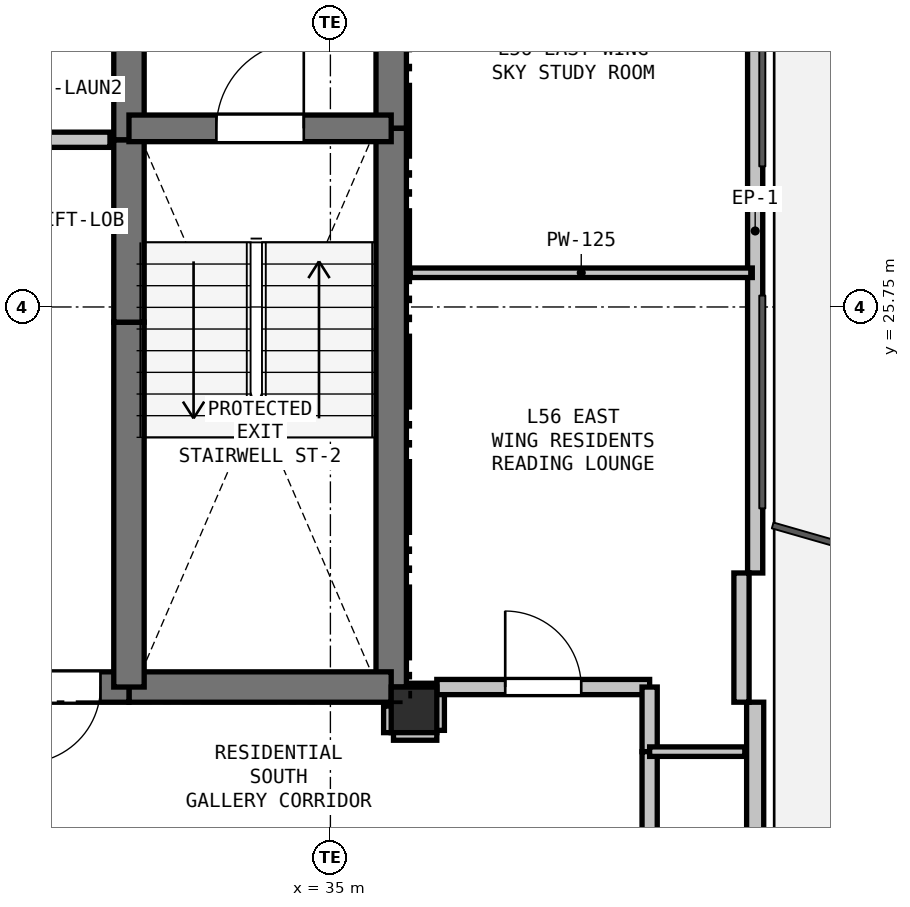
"""IFC4 building model, lengths in metres.
Left out: names, types, materials, properties, quantities, classifications, styles, units other than length and angle.
Written with IfcOpenShell. Run it as: python <this file> out.ifc"""

import sys

from ifc_helpers import new_model, si_unit, direction, frame, frame_2d, origin, origin_2d, place, context, subcontext, project, spatial, rectangle, extrude, element, fill, save


model = new_model("IFC4")
c1 = context("Model", 3, precision=1e-05, world=origin(), true_north=direction((0.0, 1.0)))
c2 = subcontext(c1, "Body", "Model", "MODEL_VIEW")
j1 = project(units=[si_unit("LENGTHUNIT", "METRE"), si_unit("PLANEANGLEUNIT", "RADIAN")], contexts=[c1])
p1 = place(None, origin())
s1 = spatial("IfcSite", under=j1, at=p1, CompositionType="ELEMENT")
p2 = place(p1, origin())
s2 = spatial("IfcBuilding", under=s1, at=p2, CompositionType="ELEMENT")
p3 = place(p2, frame((0.0, 0.0, 201.9)))
s3 = spatial("IfcBuildingStorey", under=s2, at=p3, CompositionType="ELEMENT", Elevation=201.9)
p4 = place(p3, frame((36.1, 20.45, 0.0), z_axis=(0.0, 0.0, 1.0), x_axis=(1.0, 0.0, 0.0)))
e1 = element("IfcColumn", 1, at=p4, inside=s3, PredefinedType="COLUMN", context=c2, shape_type="SweptSolid", body=[
    extrude(rectangle(XDim=0.6, YDim=0.6, at=origin_2d()), origin(), (0.0, 0.0, 1.0), 3.3),
])
p5 = place(p3, frame((40.588, 31.25, 0.0), z_axis=(0.0, 0.0, 1.0), x_axis=(0.0, -1.0, 0.0)))
e2 = element("IfcWall", 2, at=p5, inside=s3, PredefinedType="PARAPET", context=c2, shape_type="SweptSolid", body=[
    extrude(rectangle(XDim=8.999, YDim=0.2, at=frame_2d((4.5, 0.0))), origin(), (0.0, 0.0, 1.0), 0.2),
])
p6 = place(p3, frame((40.588, 20.551, 0.0), z_axis=(0.0, 0.0, 1.0), x_axis=(0.0, -1.0, 0.0)))
e3 = element("IfcWall", 3, at=p6, inside=s3, PredefinedType="SOLIDWALL", context=c2, shape_type="SweptSolid", body=[
    extrude(rectangle(XDim=9.699, YDim=0.225, at=frame_2d((4.85, 0.0))), origin(), (0.0, 0.0, 1.0), 2.69),
])
p7 = place(p6, frame((6.395, 0.0, 0.9)))
e4 = element("IfcOpeningElement", 4, at=p7, cuts=e3, PredefinedType="OPENING", context=c2, shape_type="SweptSolid", body=[
    extrude(rectangle(XDim=1.5, YDim=1.5, at=frame_2d((0.75, 0.75))), frame((0.0, 0.123, 0.0), z_axis=(0.0, -1.0, 0.0), x_axis=(1.0, 0.0, 0.0)), (0.0, 0.0, 1.0), 0.245),
])
p8 = place(p3, frame((40.408, 22.25, 0.0), z_axis=(0.0, 0.0, 1.0), x_axis=(0.0, -1.0, 0.0)))
e5 = element("IfcWall", 5, at=p8, inside=s3, PredefinedType="PARAPET", context=c2, shape_type="SweptSolid", body=[
    extrude(rectangle(XDim=1.7, YDim=0.2, at=frame_2d((0.85, 0.0))), origin(), (0.0, 0.0, 1.0), 2.69),
])
p9 = place(p3, frame((35.8, 32.75, 0.0), z_axis=(0.0, 0.0, 1.0), x_axis=(0.0, -1.0, 0.0)))
e6 = element("IfcWall", 6, at=p9, inside=s3, PredefinedType="SHEAR", context=c2, shape_type="SweptSolid", body=[
    extrude(rectangle(XDim=4.65, YDim=0.4, at=frame_2d((2.325, 0.0))), origin(), (0.0, 0.0, 1.0), 3.07),
])
p10 = place(p3, frame((35.8, 28.1, 0.0), z_axis=(0.0, 0.0, 1.0), x_axis=(0.0, -1.0, 0.0)))
e7 = element("IfcWall", 7, at=p10, inside=s3, PredefinedType="SHEAR", context=c2, shape_type="SweptSolid", body=[
    extrude(rectangle(XDim=7.35, YDim=0.4, at=frame_2d((3.675, 0.0))), origin(), (0.0, 0.0, 1.0), 3.07),
])
p11 = place(p3, frame((35.8, 20.75, 0.0), z_axis=(0.0, 0.0, 1.0), x_axis=(-1.0, 0.0, 0.0)))
e8 = element("IfcWall", 8, at=p11, inside=s3, PredefinedType="SHEAR", context=c2, shape_type="SweptSolid", body=[
    extrude(rectangle(XDim=3.45, YDim=0.4, at=frame_2d((1.725, 0.0))), origin(), (0.0, 0.0, 1.0), 3.07),
])
p12 = place(p3, frame((32.35, 20.75, 0.0), z_axis=(0.0, 0.0, 1.0), x_axis=(-1.0, 0.0, 0.0)))
e9 = element("IfcWall", 9, at=p12, inside=s3, PredefinedType="SHEAR", context=c2, shape_type="SweptSolid", body=[
    extrude(rectangle(XDim=1.75, YDim=0.4, at=frame_2d((0.875, 0.0))), origin(), (0.0, 0.0, 1.0), 3.07),
])
p13 = place(p12, frame((0.375, 0.0, 0.0)))
e10 = element("IfcOpeningElement", 10, at=p13, cuts=e9, PredefinedType="OPENING", context=c2, shape_type="SweptSolid", body=[
    extrude(rectangle(XDim=1.0, YDim=2.15, at=frame_2d((0.5, 1.075))), frame((0.0, 0.21, 0.0), z_axis=(0.0, -1.0, 0.0), x_axis=(1.0, 0.0, 0.0)), (0.0, 0.0, 1.0), 0.42),
])
p14 = place(p3, frame((32.35, 20.75, 0.0), z_axis=(0.0, 0.0, 1.0), x_axis=(0.0, 1.0, 0.0)))
e11 = element("IfcWall", 11, at=p14, inside=s3, PredefinedType="SHEAR", context=c2, shape_type="SweptSolid", body=[
    extrude(rectangle(XDim=4.8, YDim=0.4, at=frame_2d((2.4, 0.0))), origin(), (0.0, 0.0, 1.0), 3.07),
])
p15 = place(p3, frame((32.35, 25.55, 0.0), z_axis=(0.0, 0.0, 1.0), x_axis=(0.0, 1.0, 0.0)))
e12 = element("IfcWall", 12, at=p15, inside=s3, PredefinedType="SHEAR", context=c2, shape_type="SweptSolid", body=[
    extrude(rectangle(XDim=2.4, YDim=0.4, at=frame_2d((1.2, 0.0))), origin(), (0.0, 0.0, 1.0), 3.07),
])
p16 = place(p3, frame((32.35, 27.95, 0.0), z_axis=(0.0, 0.0, 1.0), x_axis=(0.0, 1.0, 0.0)))
e13 = element("IfcWall", 13, at=p16, inside=s3, PredefinedType="SHEAR", context=c2, shape_type="SweptSolid", body=[
    extrude(rectangle(XDim=2.8, YDim=0.4, at=frame_2d((1.4, 0.0))), origin(), (0.0, 0.0, 1.0), 3.07),
])
p17 = place(p3, frame((32.35, 28.1, 0.0), z_axis=(0.0, 0.0, 1.0), x_axis=(1.0, 0.0, 0.0)))
e14 = element("IfcWall", 14, at=p17, inside=s3, PredefinedType="SHEAR", context=c2, shape_type="SweptSolid", body=[
    extrude(rectangle(XDim=3.45, YDim=0.35, at=frame_2d((1.725, 0.0))), origin(), (0.0, 0.0, 1.0), 3.07),
])
p18 = place(p17, frame((1.15, 0.0, 0.0)))
e15 = element("IfcOpeningElement", 15, at=p18, cuts=e14, PredefinedType="OPENING", context=c2, shape_type="SweptSolid", body=[
    extrude(rectangle(XDim=1.15, YDim=2.15, at=frame_2d((0.575, 1.075))), frame((0.0, 0.185, 0.0), z_axis=(0.0, -1.0, 0.0), x_axis=(1.0, 0.0, 0.0)), (0.0, 0.0, 1.0), 0.37),
])
p19 = place(p3, frame((27.4, 27.95, 0.0), z_axis=(0.0, 0.0, 1.0), x_axis=(1.0, 0.0, 0.0)))
e16 = element("IfcWall", 16, at=p19, inside=s3, PredefinedType="PARTITIONING", context=c2, shape_type="SweptSolid", body=[
    extrude(rectangle(XDim=4.7, YDim=0.2, at=frame_2d((2.35, 0.0))), origin(), (0.0, 0.0, 1.0), 3.07),
])
p20 = place(p19, frame((1.85, 0.0, 0.0)))
e17 = element("IfcOpeningElement", 17, at=p20, cuts=e16, PredefinedType="OPENING", context=c2, shape_type="SweptSolid", body=[
    extrude(rectangle(XDim=1.0, YDim=2.15, at=frame_2d((0.5, 1.075))), frame((0.0, 0.11, 0.0), z_axis=(0.0, -1.0, 0.0), x_axis=(1.0, 0.0, 0.0)), (0.0, 0.0, 1.0), 0.22),
])
p21 = place(p3, frame((35.8, 20.5, 0.0), z_axis=(0.0, 0.0, 1.0), x_axis=(0.0, -1.0, 0.0)))
e18 = element("IfcWall", 18, at=p21, inside=s3, PredefinedType="PARTITIONING", context=c2, shape_type="SweptSolid", body=[
    extrude(rectangle(XDim=0.35, YDim=0.2, at=frame_2d((0.175, 0.0))), origin(), (0.0, 0.0, 1.0), 2.595),
])
p22 = place(p3, frame((35.83, 20.15, 0.0), z_axis=(0.0, 0.0, 1.0), x_axis=(1.0, 0.0, 0.0)))
e19 = element("IfcWall", 19, at=p22, inside=s3, PredefinedType="PARTITIONING", context=c2, shape_type="SweptSolid", body=[
    extrude(rectangle(XDim=0.57, YDim=0.2, at=frame_2d((0.285, 0.0))), origin(), (0.0, 0.0, 1.0), 2.518),
])
p23 = place(p3, frame((36.4, 20.18, 0.0), z_axis=(0.0, 0.0, 1.0), x_axis=(0.0, 1.0, 0.0)))
e20 = element("IfcWall", 20, at=p23, inside=s3, PredefinedType="PARTITIONING", context=c2, shape_type="SweptSolid", body=[
    extrude(rectangle(XDim=0.57, YDim=0.2, at=frame_2d((0.285, 0.0))), origin(), (0.0, 0.0, 1.0), 3.07),
])
p24 = place(p3, frame((36.4, 20.75, 0.0), z_axis=(0.0, 0.0, 1.0), x_axis=(1.0, 0.0, 0.0)))
e21 = element("IfcWall", 21, at=p24, inside=s3, PredefinedType="PARTITIONING", context=c2, shape_type="SweptSolid", body=[
    extrude(rectangle(XDim=2.8, YDim=0.2, at=frame_2d((1.4, 0.0))), origin(), (0.0, 0.0, 1.0), 3.07),
])
p25 = place(p24, frame((0.9, 0.0, 0.0)))
e22 = element("IfcOpeningElement", 22, at=p25, cuts=e21, PredefinedType="OPENING", context=c2, shape_type="SweptSolid", body=[
    extrude(rectangle(XDim=1.0, YDim=2.15, at=frame_2d((0.5, 1.075))), frame((0.0, 0.11, 0.0), z_axis=(0.0, -1.0, 0.0), x_axis=(1.0, 0.0, 0.0)), (0.0, 0.0, 1.0), 0.22),
])
p26 = place(p3, frame((39.2, 20.75, 0.0), z_axis=(0.0, 0.0, 1.0), x_axis=(0.0, -1.0, 0.0)))
e23 = element("IfcWall", 23, at=p26, inside=s3, PredefinedType="PARTITIONING", context=c2, shape_type="SweptSolid", body=[
    extrude(rectangle(XDim=0.85, YDim=0.2, at=frame_2d((0.425, 0.0))), origin(), (0.0, 0.0, 1.0), 3.07),
])
p27 = place(p3, frame((39.2, 19.9, 0.0), z_axis=(0.0, 0.0, 1.0), x_axis=(0.0, -1.0, 0.0)))
e24 = element("IfcWall", 24, at=p27, inside=s3, PredefinedType="PARTITIONING", context=c2, shape_type="SweptSolid", body=[
    extrude(rectangle(XDim=1.6, YDim=0.2, at=frame_2d((0.8, 0.0))), origin(), (0.0, 0.0, 1.0), 3.07),
])
p28 = place(p3, frame((40.55, 26.2, 0.0), z_axis=(0.0, 0.0, 1.0), x_axis=(-1.0, 0.0, 0.0)))
e25 = element("IfcWall", 25, at=p28, inside=s3, PredefinedType="PARTITIONING", context=c2, shape_type="SweptSolid", body=[
    extrude(rectangle(XDim=4.5, YDim=0.125, at=frame_2d((2.25, 0.0))), origin(), (0.0, 0.0, 1.0), 2.365),
])
p29 = place(p3, frame((36.4, 20.75, 0.0), z_axis=(0.0, 0.0, 1.0), x_axis=(-1.0, 0.0, 0.0)))
e26 = element("IfcWall", 26, at=p29, inside=s3, PredefinedType="PARTITIONING", context=c2, shape_type="SweptSolid", body=[
    extrude(rectangle(XDim=0.35, YDim=0.1, at=frame_2d((0.175, 0.0))), origin(), (0.0, 0.0, 1.0), 2.595),
])
p30 = place(p3, frame((40.452, 19.9, 0.0), z_axis=(0.0, 0.0, 1.0), x_axis=(-1.0, 0.0, 0.0)))
e27 = element("IfcWall", 27, at=p30, inside=s3, PredefinedType="PARTITIONING", context=c2, shape_type="SweptSolid", body=[
    extrude(rectangle(XDim=1.252, YDim=0.125, at=frame_2d((0.626, 0.0))), origin(), (0.0, 0.0, 1.0), 2.365),
])
p31 = place(p13, origin())
e28 = element("IfcDoor", 28, at=p31, inside=s3, OperationType="SINGLE_SWING_RIGHT", PredefinedType="DOOR", context=c2, shape_type="SweptSolid", body=[
    extrude(rectangle(XDim=1.0, YDim=2.15, at=frame_2d((0.5, 1.075))), frame((0.0, 0.025, 0.0), z_axis=(0.0, -1.0, 0.0), x_axis=(1.0, 0.0, 0.0)), (0.0, 0.0, 1.0), 0.05),
])
fill(e10, e28)
p32 = place(p18, origin())
e29 = element("IfcDoor", 29, at=p32, inside=s3, OperationType="SINGLE_SWING_RIGHT", PredefinedType="DOOR", context=c2, shape_type="SweptSolid", body=[
    extrude(rectangle(XDim=1.15, YDim=2.15, at=frame_2d((0.575, 1.075))), frame((0.0, 0.025, 0.0), z_axis=(0.0, -1.0, 0.0), x_axis=(1.0, 0.0, 0.0)), (0.0, 0.0, 1.0), 0.05),
])
fill(e15, e29)
p33 = place(p25, origin())
e30 = element("IfcDoor", 30, at=p33, inside=s3, OperationType="SINGLE_SWING_LEFT", PredefinedType="DOOR", context=c2, shape_type="SweptSolid", body=[
    extrude(rectangle(XDim=1.0, YDim=2.15, at=frame_2d((0.5, 1.075))), frame((0.0, 0.025, 0.0), z_axis=(0.0, -1.0, 0.0), x_axis=(1.0, 0.0, 0.0)), (0.0, 0.0, 1.0), 0.05),
])
fill(e22, e30)
save(model, sys.argv[1])
